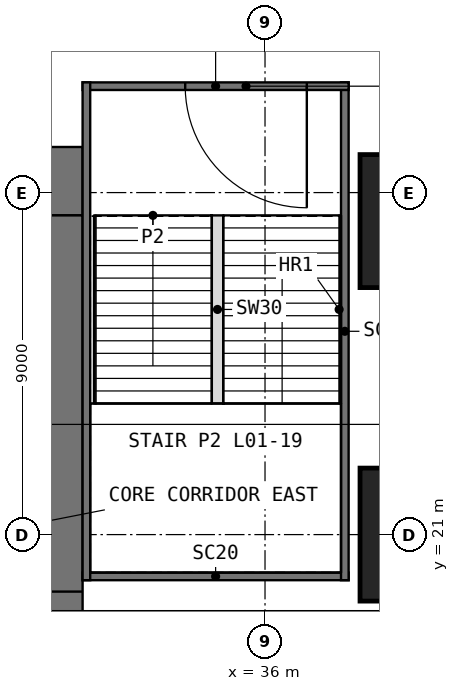
"""IFC4 building model, lengths in metres.
Left out: names, types, materials, properties, quantities, classifications, styles, units other than length and angle.
Written with IfcOpenShell. Run it as: python <this file> out.ifc"""

import sys

from ifc_helpers import new_model, si_unit, direction, frame, frame_2d, origin, origin_2d, place, context, subcontext, project, spatial, rectangle, extrude, element, fill, save


model = new_model("IFC4")
c1 = context("Model", 3, precision=1e-05, world=origin(), true_north=direction((0.0, 1.0)))
c2 = subcontext(c1, "Body", "Model", "MODEL_VIEW")
j1 = project(units=[si_unit("LENGTHUNIT", "METRE"), si_unit("PLANEANGLEUNIT", "RADIAN")], contexts=[c1])
p1 = place(None, origin())
s1 = spatial("IfcSite", under=j1, at=p1, CompositionType="ELEMENT")
p2 = place(p1, origin())
s2 = spatial("IfcBuilding", under=s1, at=p2, CompositionType="ELEMENT")
p3 = place(p2, frame((0.0, 0.0, 6.0)))
s3 = spatial("IfcBuildingStorey", under=s2, at=p3, CompositionType="ELEMENT", Elevation=6.0)
for number, where, z_axis, x_axis in (
    (1, (40.25, 21.0, 0.0), (0.0, 0.0, 1.0), (1.0, 0.0, 0.0)),
    (2, (40.25, 29.25, 0.0), (0.0, 0.0, 1.0), (1.0, 0.0, 0.0)),
):
    element("IfcColumn", number, at=place(p3, frame(where, z_axis=z_axis, x_axis=x_axis)), inside=s3, PredefinedType="COLUMN", context=c2, shape_type="SweptSolid", body=[
        extrude(rectangle(XDim=3.5, YDim=3.5, at=origin_2d()), origin(), (0.0, 0.0, 1.0), 5.0),
    ])
p4 = place(p3, frame((10.8, 30.3, -0.2), z_axis=(0.0, 0.0, 1.0), x_axis=(1.0, 0.0, 0.0)))
e3 = element("IfcWall", 3, at=p4, inside=s3, PredefinedType="SHEAR", context=c2, shape_type="SweptSolid", body=[
    extrude(rectangle(XDim=20.4, YDim=1.8, at=frame_2d((10.2, 0.0))), origin(), (0.0, 0.0, 1.0), 4.9),
])
p5 = place(p4, frame((9.2, 0.0, 0.2)))
e4 = element("IfcOpeningElement", 4, at=p5, cuts=e3, PredefinedType="OPENING", context=c2, shape_type="SweptSolid", body=[
    extrude(rectangle(XDim=2.0, YDim=2.2, at=frame_2d((1.0, 1.1))), frame((0.0, 0.91, 0.0), z_axis=(0.0, -1.0, 0.0), x_axis=(1.0, 0.0, 0.0)), (0.0, 0.0, 1.0), 1.82),
])
p6 = place(p3, frame((30.3, 12.6, -0.2), z_axis=(0.0, 0.0, 1.0), x_axis=(0.0, 1.0, 0.0)))
e5 = element("IfcWall", 5, at=p6, inside=s3, PredefinedType="SHEAR", context=c2, shape_type="SweptSolid", body=[
    extrude(rectangle(XDim=16.8, YDim=1.8, at=frame_2d((8.4, 0.0))), origin(), (0.0, 0.0, 1.0), 4.9),
])
p7 = place(p6, frame((5.9, 0.0, 0.2)))
e6 = element("IfcOpeningElement", 6, at=p7, cuts=e5, PredefinedType="OPENING", context=c2, shape_type="SweptSolid", body=[
    extrude(rectangle(XDim=1.0, YDim=2.2, at=frame_2d((0.5, 1.1))), frame((0.0, 0.91, 0.0), z_axis=(0.0, -1.0, 0.0), x_axis=(1.0, 0.0, 0.0)), (0.0, 0.0, 1.0), 1.82),
])
p8 = place(p3, frame((31.2, 19.9, -0.2), z_axis=(0.0, 0.0, 1.0), x_axis=(1.0, 0.0, 0.0)))
e7 = element("IfcWall", 7, at=p8, inside=s3, PredefinedType="SOLIDWALL", context=c2, shape_type="SweptSolid", body=[
    extrude(rectangle(XDim=7.0, YDim=0.2, at=frame_2d((3.5, 0.0))), origin(), (0.0, 0.0, 1.0), 4.9),
])
p9 = place(p3, frame((38.1, 19.8, -0.2), z_axis=(0.0, 0.0, 1.0), x_axis=(0.0, 1.0, 0.0)))
e8 = element("IfcWall", 8, at=p9, inside=s3, PredefinedType="SOLIDWALL", context=c2, shape_type="SweptSolid", body=[
    extrude(rectangle(XDim=13.1, YDim=0.2, at=frame_2d((6.55, 0.0))), origin(), (0.0, 0.0, 1.0), 4.9),
])
p10 = place(p3, frame((38.2, 32.8, -0.2), z_axis=(0.0, 0.0, 1.0), x_axis=(-1.0, 0.0, 0.0)))
e9 = element("IfcWall", 9, at=p10, inside=s3, PredefinedType="SOLIDWALL", context=c2, shape_type="SweptSolid", body=[
    extrude(rectangle(XDim=7.0, YDim=0.2, at=frame_2d((3.5, 0.0))), origin(), (0.0, 0.0, 1.0), 4.9),
])
p11 = place(p10, frame((1.1, 0.0, 0.2)))
e10 = element("IfcOpeningElement", 10, at=p11, cuts=e9, PredefinedType="OPENING", context=c2, shape_type="SweptSolid", body=[
    extrude(rectangle(XDim=3.2, YDim=2.4, at=frame_2d((1.6, 1.2))), frame((0.0, 0.11, 0.0), z_axis=(0.0, -1.0, 0.0), x_axis=(1.0, 0.0, 0.0)), (0.0, 0.0, 1.0), 0.22),
])
p12 = place(p3, frame((31.3, 32.9, -0.2), z_axis=(0.0, 0.0, 1.0), x_axis=(0.0, -1.0, 0.0)))
e11 = element("IfcWall", 11, at=p12, inside=s3, PredefinedType="SOLIDWALL", context=c2, shape_type="SweptSolid", body=[
    extrude(rectangle(XDim=13.1, YDim=0.2, at=frame_2d((6.55, 0.0))), origin(), (0.0, 0.0, 1.0), 4.9),
])
p13 = place(p3, frame((34.75, 24.45, 0.0), z_axis=(0.0, 0.0, 1.0), x_axis=(0.0, 1.0, 0.0)))
e12 = element("IfcWall", 12, at=p13, inside=s3, PredefinedType="PARTITIONING", context=c2, shape_type="SweptSolid", body=[
    extrude(rectangle(XDim=4.95, YDim=0.3, at=frame_2d((2.475, 0.0))), origin(), (0.0, 0.0, 1.0), 5.0),
])
p14 = place(p11, origin())
e13 = element("IfcDoor", 13, at=p14, inside=s3, OperationType="DOUBLE_DOOR_SINGLE_SWING", PredefinedType="DOOR", context=c2, shape_type="SweptSolid", body=[
    extrude(rectangle(XDim=3.2, YDim=2.4, at=frame_2d((1.6, 1.2))), frame((0.0, 0.025, 0.0), z_axis=(0.0, -1.0, 0.0), x_axis=(1.0, 0.0, 0.0)), (0.0, 0.0, 1.0), 0.05),
])
fill(e10, e13)
save(model, sys.argv[1])
